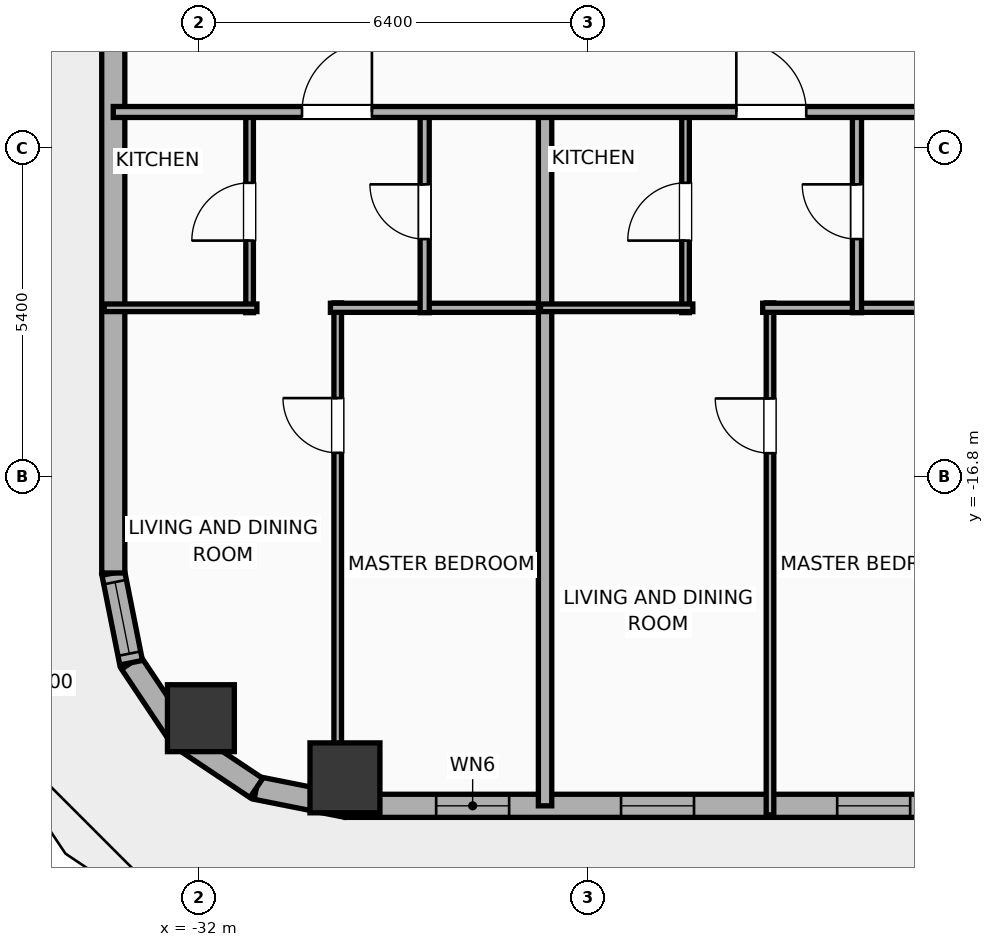
"""IFC4 building model, lengths in metres.
Left out: names, types, materials, properties, quantities, classifications, styles, units other than length and angle.
Written with IfcOpenShell. Run it as: python <this file> out.ifc"""

import sys

from ifc_helpers import new_model, si_unit, direction, frame, frame_2d, origin, origin_2d, place, context, subcontext, project, spatial, rectangle, hollow_rectangle, hollow_circle, extrude, element, fill, save


model = new_model("IFC4")
c1 = context("Model", 3, precision=1e-05, world=origin(), true_north=direction((0.0, 1.0)))
c2 = subcontext(c1, "Body", "Model", "MODEL_VIEW")
j1 = project(units=[si_unit("LENGTHUNIT", "METRE"), si_unit("PLANEANGLEUNIT", "RADIAN")], contexts=[c1])
p1 = place(None, origin())
s1 = spatial("IfcSite", under=j1, at=p1, CompositionType="ELEMENT")
p2 = place(p1, origin())
s2 = spatial("IfcBuilding", under=s1, at=p2, CompositionType="ELEMENT")
p3 = place(p2, frame((0.0, 0.0, 53.3)))
s3 = spatial("IfcBuildingStorey", under=s2, at=p3, CompositionType="ELEMENT", Elevation=53.3)
p4 = place(p3, frame((-29.6, -21.75, 0.0), z_axis=(0.0, 0.0, 1.0), x_axis=(1.0, 0.0, 0.0)))
e1 = element("IfcColumn", 1, at=p4, inside=s3, PredefinedType="COLUMN", context=c2, shape_type="SweptSolid", body=[
    extrude(hollow_rectangle(XDim=1.15, YDim=1.15, WallThickness=0.04, at=origin_2d()), origin(), (0.0, 0.0, 1.0), 3.9),
])
p5 = place(p3, frame((-31.969, -20.769, 0.0), z_axis=(0.0, 0.0, 1.0), x_axis=(1.0, 0.0, 0.0)))
e2 = element("IfcColumn", 2, at=p5, inside=s3, PredefinedType="COLUMN", context=c2, shape_type="SweptSolid", body=[
    extrude(hollow_circle(Radius=0.55, WallThickness=0.036, at=origin_2d()), origin(), (0.0, 0.0, 1.0), 3.9),
])
p6 = place(p3, frame((22.381, -22.21, 0.0), z_axis=(0.0, 0.0, 1.0), x_axis=(-1.0, 0.0, 0.0)))
e3 = element("IfcWall", 3, at=p6, inside=s3, PredefinedType="ELEMENTEDWALL", context=c2, shape_type="SweptSolid", body=[
    extrude(rectangle(XDim=51.963, YDim=0.38, at=frame_2d((25.981, 0.0))), origin(), (0.0, 0.0, 1.0), 3.65),
])
p7 = place(p6, frame((14.839, 0.0, 0.0)))
e4 = element("IfcOpeningElement", 4, at=p7, cuts=e3, PredefinedType="OPENING", context=c2, shape_type="SweptSolid", body=[
    extrude(rectangle(XDim=1.5, YDim=2.05, at=frame_2d((0.75, 1.025))), frame((0.0, 0.2, 0.0), z_axis=(0.0, -1.0, 0.0), x_axis=(1.0, 0.0, 0.0)), (0.0, 0.0, 1.0), 0.4),
])
p8 = place(p6, frame((6.61, 0.0, 0.75)))
e5 = element("IfcOpeningElement", 5, at=p8, cuts=e3, PredefinedType="OPENING", context=c2, shape_type="SweptSolid", body=[
    extrude(rectangle(XDim=2.4, YDim=2.1, at=frame_2d((1.2, 1.05))), frame((0.0, 0.2, 0.0), z_axis=(0.0, -1.0, 0.0), x_axis=(1.0, 0.0, 0.0)), (0.0, 0.0, 1.0), 0.4),
])
p9 = place(p6, frame((24.781, 0.0, 0.75)))
e6 = element("IfcOpeningElement", 6, at=p9, cuts=e3, PredefinedType="OPENING", context=c2, shape_type="SweptSolid", body=[
    extrude(rectangle(XDim=2.4, YDim=2.1, at=frame_2d((1.2, 1.05))), frame((0.0, 0.2, 0.0), z_axis=(0.0, -1.0, 0.0), x_axis=(1.0, 0.0, 0.0)), (0.0, 0.0, 1.0), 0.4),
])
p10 = place(p6, frame((49.281, 0.0, 0.75)))
e7 = element("IfcOpeningElement", 7, at=p10, cuts=e3, PredefinedType="OPENING", context=c2, shape_type="SweptSolid", body=[
    extrude(rectangle(XDim=1.2, YDim=2.05, at=frame_2d((0.6, 1.025))), frame((0.0, 0.2, 0.0), z_axis=(0.0, -1.0, 0.0), x_axis=(1.0, 0.0, 0.0)), (0.0, 0.0, 1.0), 0.4),
])
p11 = place(p6, frame((46.241, 0.0, 0.75)))
e8 = element("IfcOpeningElement", 8, at=p11, cuts=e3, PredefinedType="OPENING", context=c2, shape_type="SweptSolid", body=[
    extrude(rectangle(XDim=1.2, YDim=2.05, at=frame_2d((0.6, 1.025))), frame((0.0, 0.2, 0.0), z_axis=(0.0, -1.0, 0.0), x_axis=(1.0, 0.0, 0.0)), (0.0, 0.0, 1.0), 0.4),
])
p12 = place(p6, frame((42.686, 0.0, 0.75)))
e9 = element("IfcOpeningElement", 9, at=p12, cuts=e3, PredefinedType="OPENING", context=c2, shape_type="SweptSolid", body=[
    extrude(rectangle(XDim=1.2, YDim=2.05, at=frame_2d((0.6, 1.025))), frame((0.0, 0.2, 0.0), z_axis=(0.0, -1.0, 0.0), x_axis=(1.0, 0.0, 0.0)), (0.0, 0.0, 1.0), 0.4),
])
p13 = place(p6, frame((39.548, 0.0, 0.75)))
e10 = element("IfcOpeningElement", 10, at=p13, cuts=e3, PredefinedType="OPENING", context=c2, shape_type="SweptSolid", body=[
    extrude(rectangle(XDim=1.2, YDim=2.05, at=frame_2d((0.6, 1.025))), frame((0.0, 0.2, 0.0), z_axis=(0.0, -1.0, 0.0), x_axis=(1.0, 0.0, 0.0)), (0.0, 0.0, 1.0), 0.4),
])
p14 = place(p6, frame((34.748, 0.0, 0.75)))
e11 = element("IfcOpeningElement", 11, at=p14, cuts=e3, PredefinedType="OPENING", context=c2, shape_type="SweptSolid", body=[
    extrude(rectangle(XDim=1.2, YDim=2.05, at=frame_2d((0.6, 1.025))), frame((0.0, 0.2, 0.0), z_axis=(0.0, -1.0, 0.0), x_axis=(1.0, 0.0, 0.0)), (0.0, 0.0, 1.0), 0.4),
])
p15 = place(p6, frame((29.226, 0.0, 0.75)))
e12 = element("IfcOpeningElement", 12, at=p15, cuts=e3, PredefinedType="OPENING", context=c2, shape_type="SweptSolid", body=[
    extrude(rectangle(XDim=1.2, YDim=2.05, at=frame_2d((0.6, 1.025))), frame((0.0, 0.2, 0.0), z_axis=(0.0, -1.0, 0.0), x_axis=(1.0, 0.0, 0.0)), (0.0, 0.0, 1.0), 0.4),
])
p16 = place(p6, frame((21.568, 0.0, 0.75)))
e13 = element("IfcOpeningElement", 13, at=p16, cuts=e3, PredefinedType="OPENING", context=c2, shape_type="SweptSolid", body=[
    extrude(rectangle(XDim=0.52, YDim=2.05, at=frame_2d((0.26, 1.025))), frame((0.0, 0.2, 0.0), z_axis=(0.0, -1.0, 0.0), x_axis=(1.0, 0.0, 0.0)), (0.0, 0.0, 1.0), 0.4),
])
p17 = place(p6, frame((11.146, 0.0, 0.75)))
e14 = element("IfcOpeningElement", 14, at=p17, cuts=e3, PredefinedType="OPENING", context=c2, shape_type="SweptSolid", body=[
    extrude(rectangle(XDim=1.2, YDim=2.05, at=frame_2d((0.6, 1.025))), frame((0.0, 0.2, 0.0), z_axis=(0.0, -1.0, 0.0), x_axis=(1.0, 0.0, 0.0)), (0.0, 0.0, 1.0), 0.4),
])
p18 = place(p6, frame((1.436, 0.0, 0.75)))
e15 = element("IfcOpeningElement", 15, at=p18, cuts=e3, PredefinedType="OPENING", context=c2, shape_type="SweptSolid", body=[
    extrude(rectangle(XDim=1.2, YDim=2.05, at=frame_2d((0.6, 1.025))), frame((0.0, 0.2, 0.0), z_axis=(0.0, -1.0, 0.0), x_axis=(1.0, 0.0, 0.0)), (0.0, 0.0, 1.0), 0.4),
])
p19 = place(p3, frame((-29.581, -22.21, 0.0), z_axis=(0.0, 0.0, 1.0), x_axis=(-0.980786132421, 0.195086038585, 0.0)))
e16 = element("IfcWall", 16, at=p19, inside=s3, PredefinedType="ELEMENTEDWALL", context=c2, shape_type="SweptSolid", body=[
    extrude(rectangle(XDim=1.504, YDim=0.38, at=frame_2d((0.752, 0.0))), origin(), (0.0, 0.0, 1.0), 3.65),
])
p20 = place(p3, frame((-31.057, -21.917, 0.0), z_axis=(0.0, 0.0, 1.0), x_axis=(-0.831442848281, 0.555610286119, 0.0)))
e17 = element("IfcWall", 17, at=p20, inside=s3, PredefinedType="ELEMENTEDWALL", context=c2, shape_type="SweptSolid", body=[
    extrude(rectangle(XDim=1.485, YDim=0.38, at=frame_2d((0.743, 0.0))), origin(), (0.0, 0.0, 1.0), 3.65),
])
p21 = place(p3, frame((-32.292, -21.091, 0.0), z_axis=(0.0, 0.0, 1.0), x_axis=(-0.555572577804, 0.831468045563, 0.0)))
e18 = element("IfcWall", 18, at=p21, inside=s3, PredefinedType="ELEMENTEDWALL", context=c2, shape_type="SweptSolid", body=[
    extrude(rectangle(XDim=1.485, YDim=0.38, at=frame_2d((0.742, 0.0))), origin(), (0.0, 0.0, 1.0), 3.65),
])
p22 = place(p3, frame((-33.116, -19.857, 0.0), z_axis=(0.0, 0.0, 1.0), x_axis=(-0.195086038585, 0.980786132421, 0.0)))
e19 = element("IfcWall", 19, at=p22, inside=s3, PredefinedType="ELEMENTEDWALL", context=c2, shape_type="SweptSolid", body=[
    extrude(rectangle(XDim=1.504, YDim=0.38, at=frame_2d((0.752, 0.0))), origin(), (0.0, 0.0, 1.0), 3.65),
])
p23 = place(p22, frame((0.152, 0.0, 0.75)))
e20 = element("IfcOpeningElement", 20, at=p23, cuts=e19, PredefinedType="OPENING", context=c2, shape_type="SweptSolid", body=[
    extrude(rectangle(XDim=1.2, YDim=2.05, at=frame_2d((0.6, 1.025))), frame((0.0, 0.2, 0.0), z_axis=(0.0, -1.0, 0.0), x_axis=(1.0, 0.0, 0.0)), (0.0, 0.0, 1.0), 0.4),
])
p24 = place(p3, frame((-33.41, -18.381, 0.0), z_axis=(0.0, 0.0, 1.0), x_axis=(0.0, 1.0, 0.0)))
e21 = element("IfcWall", 21, at=p24, inside=s3, PredefinedType="ELEMENTEDWALL", context=c2, shape_type="SweptSolid", body=[
    extrude(rectangle(XDim=36.763, YDim=0.38, at=frame_2d((18.381, 0.0))), origin(), (0.0, 0.0, 1.0), 3.65),
])
p25 = place(p24, frame((17.631, 0.0, 0.0)))
e22 = element("IfcOpeningElement", 22, at=p25, cuts=e21, PredefinedType="OPENING", context=c2, shape_type="SweptSolid", body=[
    extrude(rectangle(XDim=1.5, YDim=2.05, at=frame_2d((0.75, 1.025))), frame((0.0, 0.2, 0.0), z_axis=(0.0, -1.0, 0.0), x_axis=(1.0, 0.0, 0.0)), (0.0, 0.0, 1.0), 0.4),
])
p26 = place(p24, frame((33.207, 0.0, 0.75)))
e23 = element("IfcOpeningElement", 23, at=p26, cuts=e21, PredefinedType="OPENING", context=c2, shape_type="SweptSolid", body=[
    extrude(rectangle(XDim=1.2, YDim=2.05, at=frame_2d((0.6, 1.025))), frame((0.0, 0.2, 0.0), z_axis=(0.0, -1.0, 0.0), x_axis=(1.0, 0.0, 0.0)), (0.0, 0.0, 1.0), 0.4),
])
p27 = place(p3, frame((-29.719, -22.335, 0.0), z_axis=(0.0, 0.0, 1.0), x_axis=(0.0, 1.0, 0.0)))
e24 = element("IfcWall", 24, at=p27, inside=s3, PredefinedType="PARTITIONING", context=c2, shape_type="SweptSolid", body=[
    extrude(rectangle(XDim=8.396, YDim=0.125, at=frame_2d((4.198, 0.0))), origin(), (0.0, 0.0, 1.0), 2.94),
])
p28 = place(p27, frame((5.931, 0.0, 0.0)))
e25 = element("IfcOpeningElement", 25, at=p28, cuts=e24, PredefinedType="OPENING", context=c2, shape_type="SweptSolid", body=[
    extrude(rectangle(XDim=0.9, YDim=2.05, at=frame_2d((0.45, 1.025))), frame((0.0, 0.073, 0.0), z_axis=(0.0, -1.0, 0.0), x_axis=(1.0, 0.0, 0.0)), (0.0, 0.0, 1.0), 0.145),
])
p29 = place(p3, frame((-29.839, -14.02, 0.0), z_axis=(0.0, 0.0, 1.0), x_axis=(1.0, 0.0, 0.0)))
e26 = element("IfcWall", 26, at=p29, inside=s3, PredefinedType="PLUMBINGWALL", context=c2, shape_type="SweptSolid", body=[
    extrude(rectangle(XDim=3.605, YDim=0.15, at=frame_2d((1.803, 0.0))), origin(), (0.0, 0.0, 1.0), 3.65),
])
p30 = place(p3, frame((-31.168, -14.1, 0.0), z_axis=(0.0, 0.0, 1.0), x_axis=(0.0, 1.0, 0.0)))
e27 = element("IfcWall", 27, at=p30, inside=s3, PredefinedType="PARTITIONING", context=c2, shape_type="SweptSolid", body=[
    extrude(rectangle(XDim=3.32, YDim=0.125, at=frame_2d((1.66, 0.0))), origin(), (0.0, 0.0, 1.0), 2.94),
])
p31 = place(p30, frame((1.185, 0.0, 0.0)))
e28 = element("IfcOpeningElement", 28, at=p31, cuts=e27, PredefinedType="OPENING", context=c2, shape_type="SweptSolid", body=[
    extrude(rectangle(XDim=0.95, YDim=2.05, at=frame_2d((0.475, 1.025))), frame((0.0, 0.073, 0.0), z_axis=(0.0, -1.0, 0.0), x_axis=(1.0, 0.0, 0.0)), (0.0, 0.0, 1.0), 0.145),
])
p32 = place(p3, frame((-33.56, -14.02, 0.0), z_axis=(0.0, 0.0, 1.0), x_axis=(1.0, 0.0, 0.0)))
e29 = element("IfcWall", 29, at=p32, inside=s3, PredefinedType="PARTITIONING", context=c2, shape_type="SweptSolid", body=[
    extrude(rectangle(XDim=2.512, YDim=0.125, at=frame_2d((1.256, 0.0))), origin(), (0.0, 0.0, 1.0), 3.65),
])
p33 = place(p3, frame((-28.289, -14.1, 0.0), z_axis=(0.0, 0.0, 1.0), x_axis=(0.0, 1.0, 0.0)))
e30 = element("IfcWall", 30, at=p33, inside=s3, PredefinedType="PLUMBINGWALL", context=c2, shape_type="SweptSolid", body=[
    extrude(rectangle(XDim=3.32, YDim=0.15, at=frame_2d((1.66, 0.0))), origin(), (0.0, 0.0, 1.0), 3.65),
])
p34 = place(p33, frame((1.21, 0.0, 0.0)))
e31 = element("IfcOpeningElement", 31, at=p34, cuts=e30, PredefinedType="OPENING", context=c2, shape_type="SweptSolid", body=[
    extrude(rectangle(XDim=0.9, YDim=2.05, at=frame_2d((0.45, 1.025))), frame((0.0, 0.085, 0.0), z_axis=(0.0, -1.0, 0.0), x_axis=(1.0, 0.0, 0.0)), (0.0, 0.0, 1.0), 0.17),
])
p35 = place(p3, frame((-26.309, -22.21, 0.0), z_axis=(0.0, 0.0, 1.0), x_axis=(0.0, 1.0, 0.0)))
e32 = element("IfcWall", 32, at=p35, inside=s3, PredefinedType="PARTITIONING", context=c2, shape_type="SweptSolid", body=[
    extrude(rectangle(XDim=11.49, YDim=0.22, at=frame_2d((5.745, 0.0))), origin(), (0.0, 0.0, 1.0), 3.65),
])
p36 = place(p3, frame((-22.61, -22.36, 0.0), z_axis=(0.0, 0.0, 1.0), x_axis=(0.0, 1.0, 0.0)))
e33 = element("IfcWall", 33, at=p36, inside=s3, PredefinedType="PARTITIONING", context=c2, shape_type="SweptSolid", body=[
    extrude(rectangle(XDim=8.42, YDim=0.125, at=frame_2d((4.21, 0.0))), origin(), (0.0, 0.0, 1.0), 3.65),
])
p37 = place(p36, frame((5.949, 0.0, 0.0)))
e34 = element("IfcOpeningElement", 34, at=p37, cuts=e33, PredefinedType="OPENING", context=c2, shape_type="SweptSolid", body=[
    extrude(rectangle(XDim=0.9, YDim=2.05, at=frame_2d((0.45, 1.025))), frame((0.0, 0.073, 0.0), z_axis=(0.0, -1.0, 0.0), x_axis=(1.0, 0.0, 0.0)), (0.0, 0.0, 1.0), 0.145),
])
p38 = place(p3, frame((-22.73, -14.02, 0.0), z_axis=(0.0, 0.0, 1.0), x_axis=(1.0, 0.0, 0.0)))
e35 = element("IfcWall", 35, at=p38, inside=s3, PredefinedType="PLUMBINGWALL", context=c2, shape_type="SweptSolid", body=[
    extrude(rectangle(XDim=3.79, YDim=0.15, at=frame_2d((1.895, 0.0))), origin(), (0.0, 0.0, 1.0), 3.65),
])
p39 = place(p3, frame((-23.999, -14.1, 0.0), z_axis=(0.0, 0.0, 1.0), x_axis=(0.0, 1.0, 0.0)))
e36 = element("IfcWall", 36, at=p39, inside=s3, PredefinedType="PARTITIONING", context=c2, shape_type="SweptSolid", body=[
    extrude(rectangle(XDim=3.32, YDim=0.125, at=frame_2d((1.66, 0.0))), origin(), (0.0, 0.0, 1.0), 3.65),
])
p40 = place(p39, frame((1.185, 0.0, 0.0)))
e37 = element("IfcOpeningElement", 37, at=p40, cuts=e36, PredefinedType="OPENING", context=c2, shape_type="SweptSolid", body=[
    extrude(rectangle(XDim=0.95, YDim=2.05, at=frame_2d((0.475, 1.025))), frame((0.0, 0.073, 0.0), z_axis=(0.0, -1.0, 0.0), x_axis=(1.0, 0.0, 0.0)), (0.0, 0.0, 1.0), 0.145),
])
p41 = place(p3, frame((-26.384, -14.02, 0.0), z_axis=(0.0, 0.0, 1.0), x_axis=(1.0, 0.0, 0.0)))
e38 = element("IfcWall", 38, at=p41, inside=s3, PredefinedType="PARTITIONING", context=c2, shape_type="SweptSolid", body=[
    extrude(rectangle(XDim=2.505, YDim=0.125, at=frame_2d((1.252, 0.0))), origin(), (0.0, 0.0, 1.0), 3.65),
])
p42 = place(p3, frame((-21.18, -14.1, 0.0), z_axis=(0.0, 0.0, 1.0), x_axis=(0.0, 1.0, 0.0)))
e39 = element("IfcWall", 39, at=p42, inside=s3, PredefinedType="PLUMBINGWALL", context=c2, shape_type="SweptSolid", body=[
    extrude(rectangle(XDim=3.32, YDim=0.15, at=frame_2d((1.66, 0.0))), origin(), (0.0, 0.0, 1.0), 3.65),
])
p43 = place(p42, frame((1.21, 0.0, 0.0)))
e40 = element("IfcOpeningElement", 40, at=p43, cuts=e39, PredefinedType="OPENING", context=c2, shape_type="SweptSolid", body=[
    extrude(rectangle(XDim=0.9, YDim=2.05, at=frame_2d((0.45, 1.025))), frame((0.0, 0.085, 0.0), z_axis=(0.0, -1.0, 0.0), x_axis=(1.0, 0.0, 0.0)), (0.0, 0.0, 1.0), 0.17),
])
p44 = place(p3, frame((-33.41, -10.8, 0.0), z_axis=(0.0, 0.0, 1.0), x_axis=(1.0, 0.0, 0.0)))
e41 = element("IfcWall", 41, at=p44, inside=s3, PredefinedType="PARTITIONING", context=c2, shape_type="SweptSolid", body=[
    extrude(rectangle(XDim=59.62, YDim=0.18, at=frame_2d((29.81, 0.0))), origin(), (0.0, 0.0, 1.0), 3.65),
])
p45 = place(p44, frame((3.104, 0.0, 0.0)))
e42 = element("IfcOpeningElement", 42, at=p45, cuts=e41, PredefinedType="OPENING", context=c2, shape_type="SweptSolid", body=[
    extrude(rectangle(XDim=1.15, YDim=2.05, at=frame_2d((0.575, 1.025))), frame((0.0, 0.1, 0.0), z_axis=(0.0, -1.0, 0.0), x_axis=(1.0, 0.0, 0.0)), (0.0, 0.0, 1.0), 0.2),
])
p46 = place(p44, frame((10.246, 0.0, 0.0)))
e43 = element("IfcOpeningElement", 43, at=p46, cuts=e41, PredefinedType="OPENING", context=c2, shape_type="SweptSolid", body=[
    extrude(rectangle(XDim=1.15, YDim=2.05, at=frame_2d((0.575, 1.025))), frame((0.0, 0.1, 0.0), z_axis=(0.0, -1.0, 0.0), x_axis=(1.0, 0.0, 0.0)), (0.0, 0.0, 1.0), 0.2),
])
p47 = place(p44, frame((18.336, 0.0, 0.0)))
e44 = element("IfcOpeningElement", 44, at=p47, cuts=e41, PredefinedType="OPENING", context=c2, shape_type="SweptSolid", body=[
    extrude(rectangle(XDim=1.15, YDim=2.05, at=frame_2d((0.575, 1.025))), frame((0.0, 0.1, 0.0), z_axis=(0.0, -1.0, 0.0), x_axis=(1.0, 0.0, 0.0)), (0.0, 0.0, 1.0), 0.2),
])
p48 = place(p44, frame((28.287, 0.0, 0.0)))
e45 = element("IfcOpeningElement", 45, at=p48, cuts=e41, PredefinedType="OPENING", context=c2, shape_type="SweptSolid", body=[
    extrude(rectangle(XDim=1.15, YDim=2.05, at=frame_2d((0.575, 1.025))), frame((0.0, 0.1, 0.0), z_axis=(0.0, -1.0, 0.0), x_axis=(1.0, 0.0, 0.0)), (0.0, 0.0, 1.0), 0.2),
])
p49 = place(p44, frame((37.653, 0.0, 0.0)))
e46 = element("IfcOpeningElement", 46, at=p49, cuts=e41, PredefinedType="OPENING", context=c2, shape_type="SweptSolid", body=[
    extrude(rectangle(XDim=1.15, YDim=2.05, at=frame_2d((0.575, 1.025))), frame((0.0, 0.1, 0.0), z_axis=(0.0, -1.0, 0.0), x_axis=(1.0, 0.0, 0.0)), (0.0, 0.0, 1.0), 0.2),
])
p50 = place(p44, frame((47.604, 0.0, 0.0)))
e47 = element("IfcOpeningElement", 47, at=p50, cuts=e41, PredefinedType="OPENING", context=c2, shape_type="SweptSolid", body=[
    extrude(rectangle(XDim=1.15, YDim=2.05, at=frame_2d((0.575, 1.025))), frame((0.0, 0.1, 0.0), z_axis=(0.0, -1.0, 0.0), x_axis=(1.0, 0.0, 0.0)), (0.0, 0.0, 1.0), 0.2),
])
p51 = place(p44, frame((55.736, 0.0, 0.0)))
e48 = element("IfcOpeningElement", 48, at=p51, cuts=e41, PredefinedType="OPENING", context=c2, shape_type="SweptSolid", body=[
    extrude(rectangle(XDim=1.15, YDim=2.05, at=frame_2d((0.575, 1.025))), frame((0.0, 0.1, 0.0), z_axis=(0.0, -1.0, 0.0), x_axis=(1.0, 0.0, 0.0)), (0.0, 0.0, 1.0), 0.2),
])
p52 = place(p23, origin())
e49 = element("IfcWindow", 49, at=p52, inside=s3, PartitioningType="SINGLE_PANEL", PredefinedType="WINDOW", context=c2, shape_type="SweptSolid", body=[
    extrude(rectangle(XDim=1.2, YDim=2.05, at=frame_2d((0.6, 1.025))), frame((0.0, 0.03, 0.0), z_axis=(0.0, -1.0, 0.0), x_axis=(1.0, 0.0, 0.0)), (0.0, 0.0, 1.0), 0.06),
])
fill(e20, e49)
p53 = place(p10, origin())
e50 = element("IfcWindow", 50, at=p53, inside=s3, PartitioningType="SINGLE_PANEL", PredefinedType="WINDOW", context=c2, shape_type="SweptSolid", body=[
    extrude(rectangle(XDim=1.2, YDim=2.05, at=frame_2d((0.6, 1.025))), frame((0.0, 0.03, 0.0), z_axis=(0.0, -1.0, 0.0), x_axis=(1.0, 0.0, 0.0)), (0.0, 0.0, 1.0), 0.06),
])
fill(e7, e50)
p54 = place(p11, origin())
e51 = element("IfcWindow", 51, at=p54, inside=s3, PartitioningType="SINGLE_PANEL", PredefinedType="WINDOW", context=c2, shape_type="SweptSolid", body=[
    extrude(rectangle(XDim=1.2, YDim=2.05, at=frame_2d((0.6, 1.025))), frame((0.0, 0.03, 0.0), z_axis=(0.0, -1.0, 0.0), x_axis=(1.0, 0.0, 0.0)), (0.0, 0.0, 1.0), 0.06),
])
fill(e8, e51)
p55 = place(p12, origin())
e52 = element("IfcWindow", 52, at=p55, inside=s3, PartitioningType="SINGLE_PANEL", PredefinedType="WINDOW", context=c2, shape_type="SweptSolid", body=[
    extrude(rectangle(XDim=1.2, YDim=2.05, at=frame_2d((0.6, 1.025))), frame((0.0, 0.03, 0.0), z_axis=(0.0, -1.0, 0.0), x_axis=(1.0, 0.0, 0.0)), (0.0, 0.0, 1.0), 0.06),
])
fill(e9, e52)
p56 = place(p28, origin())
e53 = element("IfcDoor", 53, at=p56, inside=s3, OperationType="SINGLE_SWING_RIGHT", PredefinedType="DOOR", context=c2, shape_type="SweptSolid", body=[
    extrude(rectangle(XDim=0.9, YDim=2.05, at=frame_2d((0.45, 1.025))), frame((0.0, 0.025, 0.0), z_axis=(0.0, -1.0, 0.0), x_axis=(1.0, 0.0, 0.0)), (0.0, 0.0, 1.0), 0.05),
])
fill(e25, e53)
p57 = place(p31, origin())
e54 = element("IfcDoor", 54, at=p57, inside=s3, OperationType="SINGLE_SWING_LEFT", PredefinedType="DOOR", context=c2, shape_type="SweptSolid", body=[
    extrude(rectangle(XDim=0.95, YDim=2.05, at=frame_2d((0.475, 1.025))), frame((0.0, 0.025, 0.0), z_axis=(0.0, -1.0, 0.0), x_axis=(1.0, 0.0, 0.0)), (0.0, 0.0, 1.0), 0.05),
])
fill(e28, e54)
p58 = place(p34, origin())
e55 = element("IfcDoor", 55, at=p58, inside=s3, OperationType="SINGLE_SWING_RIGHT", PredefinedType="DOOR", context=c2, shape_type="SweptSolid", body=[
    extrude(rectangle(XDim=0.9, YDim=2.05, at=frame_2d((0.45, 1.025))), frame((0.0, 0.025, 0.0), z_axis=(0.0, -1.0, 0.0), x_axis=(1.0, 0.0, 0.0)), (0.0, 0.0, 1.0), 0.05),
])
fill(e31, e55)
p59 = place(p37, origin())
e56 = element("IfcDoor", 56, at=p59, inside=s3, OperationType="SINGLE_SWING_RIGHT", PredefinedType="DOOR", context=c2, shape_type="SweptSolid", body=[
    extrude(rectangle(XDim=0.9, YDim=2.05, at=frame_2d((0.45, 1.025))), frame((0.0, 0.025, 0.0), z_axis=(0.0, -1.0, 0.0), x_axis=(1.0, 0.0, 0.0)), (0.0, 0.0, 1.0), 0.05),
])
fill(e34, e56)
p60 = place(p40, origin())
e57 = element("IfcDoor", 57, at=p60, inside=s3, OperationType="SINGLE_SWING_LEFT", PredefinedType="DOOR", context=c2, shape_type="SweptSolid", body=[
    extrude(rectangle(XDim=0.95, YDim=2.05, at=frame_2d((0.475, 1.025))), frame((0.0, 0.025, 0.0), z_axis=(0.0, -1.0, 0.0), x_axis=(1.0, 0.0, 0.0)), (0.0, 0.0, 1.0), 0.05),
])
fill(e37, e57)
p61 = place(p43, origin())
e58 = element("IfcDoor", 58, at=p61, inside=s3, OperationType="SINGLE_SWING_RIGHT", PredefinedType="DOOR", context=c2, shape_type="SweptSolid", body=[
    extrude(rectangle(XDim=0.9, YDim=2.05, at=frame_2d((0.45, 1.025))), frame((0.0, 0.025, 0.0), z_axis=(0.0, -1.0, 0.0), x_axis=(1.0, 0.0, 0.0)), (0.0, 0.0, 1.0), 0.05),
])
fill(e40, e58)
p62 = place(p45, origin())
e59 = element("IfcDoor", 59, at=p62, inside=s3, OperationType="SINGLE_SWING_RIGHT", PredefinedType="DOOR", context=c2, shape_type="SweptSolid", body=[
    extrude(rectangle(XDim=1.15, YDim=2.05, at=frame_2d((0.575, 1.025))), frame((0.0, 0.025, 0.0), z_axis=(0.0, -1.0, 0.0), x_axis=(1.0, 0.0, 0.0)), (0.0, 0.0, 1.0), 0.05),
])
fill(e42, e59)
p63 = place(p46, origin())
e60 = element("IfcDoor", 60, at=p63, inside=s3, OperationType="SINGLE_SWING_LEFT", PredefinedType="DOOR", context=c2, shape_type="SweptSolid", body=[
    extrude(rectangle(XDim=1.15, YDim=2.05, at=frame_2d((0.575, 1.025))), frame((0.0, 0.025, 0.0), z_axis=(0.0, -1.0, 0.0), x_axis=(1.0, 0.0, 0.0)), (0.0, 0.0, 1.0), 0.05),
])
fill(e43, e60)
save(model, sys.argv[1])
